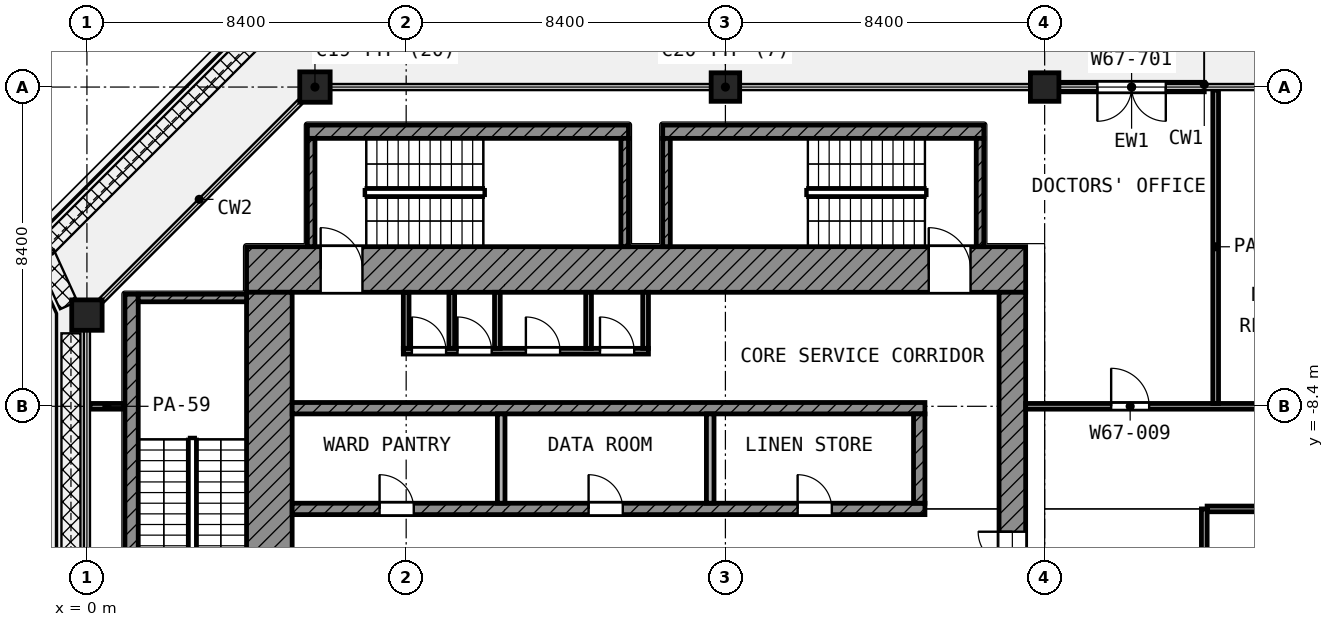
"""IFC4 building model, lengths in metres.
Left out: names, types, materials, properties, quantities, classifications, styles, units other than length and angle.
Written with IfcOpenShell. Run it as: python <this file> out.ifc"""

import sys

from ifc_helpers import new_model, si_unit, direction, frame, frame_2d, origin, origin_2d, place, context, subcontext, project, spatial, rectangle, extrude, element, fill, save


model = new_model("IFC4")
c1 = context("Model", 3, precision=1e-05, world=origin(), true_north=direction((0.0, 1.0)))
c2 = subcontext(c1, "Body", "Model", "MODEL_VIEW")
j1 = project(units=[si_unit("LENGTHUNIT", "METRE"), si_unit("PLANEANGLEUNIT", "RADIAN")], contexts=[c1])
p1 = place(None, origin())
s1 = spatial("IfcSite", under=j1, at=p1, CompositionType="ELEMENT")
p2 = place(p1, origin())
s2 = spatial("IfcBuilding", under=s1, at=p2, CompositionType="ELEMENT")
p3 = place(p2, frame((0.0, 0.0, 311.2)))
s3 = spatial("IfcBuildingStorey", under=s2, at=p3, CompositionType="ELEMENT", Elevation=311.2)
p4 = place(p3, frame((6.0, 0.0, 0.0), z_axis=(0.0, 0.0, 1.0), x_axis=(1.0, 0.0, 0.0)))
e1 = element("IfcColumn", 1, at=p4, inside=s3, PredefinedType="COLUMN", context=c2, shape_type="SweptSolid", body=[
    extrude(rectangle(XDim=0.8, YDim=0.8, at=origin_2d()), origin(), (0.0, 0.0, 1.0), 4.2),
])
for number, where, z_axis, x_axis in (
    (2, (16.8, 0.0, 0.0), (0.0, 0.0, 1.0), (1.0, 0.0, 0.0)),
    (3, (25.2, 0.0, 0.0), (0.0, 0.0, 1.0), (1.0, 0.0, 0.0)),
):
    element("IfcColumn", number, at=place(p3, frame(where, z_axis=z_axis, x_axis=x_axis)), inside=s3, PredefinedType="COLUMN", context=c2, shape_type="SweptSolid", body=[
        extrude(rectangle(XDim=0.75, YDim=0.75, at=origin_2d()), origin(), (0.0, 0.0, 1.0), 4.2),
    ])
p5 = place(p3, frame((0.0, -6.0, 0.0), z_axis=(0.0, 0.0, 1.0), x_axis=(1.0, 0.0, 0.0)))
e4 = element("IfcColumn", 4, at=p5, inside=s3, PredefinedType="COLUMN", context=c2, shape_type="SweptSolid", body=[
    extrude(rectangle(XDim=0.8, YDim=0.8, at=origin_2d()), origin(), (0.0, 0.0, 1.0), 4.2),
])
p6 = place(p3, frame((29.4, 0.0, 0.0), z_axis=(0.0, 0.0, 1.0), x_axis=(-1.0, 0.0, 0.0)))
e5 = element("IfcWall", 5, at=p6, inside=s3, PredefinedType="SOLIDWALL", context=c2, shape_type="SweptSolid", body=[
    extrude(rectangle(XDim=3.825, YDim=0.25, at=frame_2d((1.913, 0.0))), origin(), (0.0, 0.0, 1.0), 3.48),
])
p7 = place(p6, frame((1.012, 0.0, 0.0)))
e6 = element("IfcOpeningElement", 6, at=p7, cuts=e5, PredefinedType="OPENING", context=c2, shape_type="SweptSolid", body=[
    extrude(rectangle(XDim=1.8, YDim=2.1, at=frame_2d((0.9, 1.05))), frame((0.0, 0.135, 0.0), z_axis=(0.0, -1.0, 0.0), x_axis=(1.0, 0.0, 0.0)), (0.0, 0.0, 1.0), 0.27),
])
p8 = place(p3, frame((4.2, -4.8, 0.0), z_axis=(0.0, 0.0, 1.0), x_axis=(1.0, 0.0, 0.0)))
e7 = element("IfcWall", 7, at=p8, inside=s3, PredefinedType="SHEAR", context=c2, shape_type="SweptSolid", body=[
    extrude(rectangle(XDim=20.5, YDim=1.2, at=frame_2d((10.25, 0.0))), origin(), (0.0, 0.0, 1.0), 3.6),
])
p9 = place(p8, frame((1.95, 0.0, 0.0)))
e8 = element("IfcOpeningElement", 8, at=p9, cuts=e7, PredefinedType="OPENING", context=c2, shape_type="SweptSolid", body=[
    extrude(rectangle(XDim=1.1, YDim=2.1, at=frame_2d((0.55, 1.05))), frame((0.0, 0.61, 0.0), z_axis=(0.0, -1.0, 0.0), x_axis=(1.0, 0.0, 0.0)), (0.0, 0.0, 1.0), 1.22),
])
p10 = place(p8, frame((17.95, 0.0, 0.0)))
e9 = element("IfcOpeningElement", 9, at=p10, cuts=e7, PredefinedType="OPENING", context=c2, shape_type="SweptSolid", body=[
    extrude(rectangle(XDim=1.1, YDim=2.1, at=frame_2d((0.55, 1.05))), frame((0.0, 0.61, 0.0), z_axis=(0.0, -1.0, 0.0), x_axis=(1.0, 0.0, 0.0)), (0.0, 0.0, 1.0), 1.22),
])
p11 = place(p3, frame((4.8, -24.7, 0.0), z_axis=(0.0, 0.0, 1.0), x_axis=(0.0, 1.0, 0.0)))
e10 = element("IfcWall", 10, at=p11, inside=s3, PredefinedType="SHEAR", context=c2, shape_type="SweptSolid", body=[
    extrude(rectangle(XDim=19.3, YDim=1.2, at=frame_2d((9.65, 0.0))), origin(), (0.0, 0.0, 1.0), 3.6),
])
p12 = place(p11, frame((11.15, 0.0, 0.0)))
e11 = element("IfcOpeningElement", 11, at=p12, cuts=e10, PredefinedType="OPENING", context=c2, shape_type="SweptSolid", body=[
    extrude(rectangle(XDim=1.1, YDim=2.1, at=frame_2d((0.55, 1.05))), frame((0.0, 0.61, 0.0), z_axis=(0.0, -1.0, 0.0), x_axis=(1.0, 0.0, 0.0)), (0.0, 0.0, 1.0), 1.22),
])
p13 = place(p11, frame((1.85, 0.0, 0.0)))
e12 = element("IfcOpeningElement", 12, at=p13, cuts=e10, PredefinedType="OPENING", context=c2, shape_type="SweptSolid", body=[
    extrude(rectangle(XDim=1.1, YDim=2.1, at=frame_2d((0.55, 1.05))), frame((0.0, 0.61, 0.0), z_axis=(0.0, -1.0, 0.0), x_axis=(1.0, 0.0, 0.0)), (0.0, 0.0, 1.0), 1.22),
])
p14 = place(p3, frame((24.35, -24.0, 0.0), z_axis=(0.0, 0.0, 1.0), x_axis=(0.0, 1.0, 0.0)))
e13 = element("IfcWall", 13, at=p14, inside=s3, PredefinedType="SHEAR", context=c2, shape_type="SweptSolid", body=[
    extrude(rectangle(XDim=18.6, YDim=0.7, at=frame_2d((9.3, 0.0))), origin(), (0.0, 0.0, 1.0), 3.6),
])
p15 = place(p14, frame((10.5, 0.0, 0.0)))
e14 = element("IfcOpeningElement", 14, at=p15, cuts=e13, PredefinedType="OPENING", context=c2, shape_type="SweptSolid", body=[
    extrude(rectangle(XDim=1.8, YDim=2.1, at=frame_2d((0.9, 1.05))), frame((0.0, 0.36, 0.0), z_axis=(0.0, -1.0, 0.0), x_axis=(1.0, 0.0, 0.0)), (0.0, 0.0, 1.0), 0.72),
])
p16 = place(p3, frame((5.4, -8.45, 0.0), z_axis=(0.0, 0.0, 1.0), x_axis=(1.0, 0.0, 0.0)))
e15 = element("IfcWall", 15, at=p16, inside=s3, PredefinedType="SHEAR", context=c2, shape_type="SweptSolid", body=[
    extrude(rectangle(XDim=16.65, YDim=0.3, at=frame_2d((8.325, 0.0))), origin(), (0.0, 0.0, 1.0), 3.6),
])
p17 = place(p3, frame((5.4, -11.1, 0.0), z_axis=(0.0, 0.0, 1.0), x_axis=(1.0, 0.0, 0.0)))
e16 = element("IfcWall", 16, at=p17, inside=s3, PredefinedType="SHEAR", context=c2, shape_type="SweptSolid", body=[
    extrude(rectangle(XDim=16.65, YDim=0.3, at=frame_2d((8.325, 0.0))), origin(), (0.0, 0.0, 1.0), 3.6),
])
p18 = place(p17, frame((2.3, 0.0, 0.0)))
e17 = element("IfcOpeningElement", 17, at=p18, cuts=e16, PredefinedType="OPENING", context=c2, shape_type="SweptSolid", body=[
    extrude(rectangle(XDim=0.9, YDim=2.1, at=frame_2d((0.45, 1.05))), frame((0.0, 0.16, 0.0), z_axis=(0.0, -1.0, 0.0), x_axis=(1.0, 0.0, 0.0)), (0.0, 0.0, 1.0), 0.32),
])
p19 = place(p17, frame((7.8, 0.0, 0.0)))
e18 = element("IfcOpeningElement", 18, at=p19, cuts=e16, PredefinedType="OPENING", context=c2, shape_type="SweptSolid", body=[
    extrude(rectangle(XDim=0.9, YDim=2.1, at=frame_2d((0.45, 1.05))), frame((0.0, 0.16, 0.0), z_axis=(0.0, -1.0, 0.0), x_axis=(1.0, 0.0, 0.0)), (0.0, 0.0, 1.0), 0.32),
])
p20 = place(p17, frame((13.3, 0.0, 0.0)))
e19 = element("IfcOpeningElement", 19, at=p20, cuts=e16, PredefinedType="OPENING", context=c2, shape_type="SweptSolid", body=[
    extrude(rectangle(XDim=0.9, YDim=2.1, at=frame_2d((0.45, 1.05))), frame((0.0, 0.16, 0.0), z_axis=(0.0, -1.0, 0.0), x_axis=(1.0, 0.0, 0.0)), (0.0, 0.0, 1.0), 0.32),
])
p21 = place(p3, frame((21.9, -10.95, 0.0), z_axis=(0.0, 0.0, 1.0), x_axis=(0.0, 1.0, 0.0)))
e20 = element("IfcWall", 20, at=p21, inside=s3, PredefinedType="SHEAR", context=c2, shape_type="SweptSolid", body=[
    extrude(rectangle(XDim=2.35, YDim=0.3, at=frame_2d((1.175, 0.0))), origin(), (0.0, 0.0, 1.0), 3.6),
])
for number, where, z_axis, x_axis in (
    (21, (10.9, -10.95, 0.0), (0.0, 0.0, 1.0), (0.0, 1.0, 0.0)),
    (22, (16.4, -10.95, 0.0), (0.0, 0.0, 1.0), (0.0, 1.0, 0.0)),
):
    element("IfcWall", number, at=place(p3, frame(where, z_axis=z_axis, x_axis=x_axis)), inside=s3, PredefinedType="PARTITIONING", context=c2, shape_type="SweptSolid", body=[
        extrude(rectangle(XDim=2.35, YDim=0.2, at=frame_2d((1.175, 0.0))), origin(), (0.0, 0.0, 1.0), 3.6),
    ])
p22 = place(p3, frame((8.325, -6.95, 0.0), z_axis=(0.0, 0.0, 1.0), x_axis=(1.0, 0.0, 0.0)))
e23 = element("IfcWall", 23, at=p22, inside=s3, PredefinedType="PARTITIONING", context=c2, shape_type="SweptSolid", body=[
    extrude(rectangle(XDim=6.45, YDim=0.15, at=frame_2d((3.225, 0.0))), origin(), (0.0, 0.0, 1.0), 3.6),
])
p23 = place(p22, frame((0.225, 0.0, 0.0)))
e24 = element("IfcOpeningElement", 24, at=p23, cuts=e23, PredefinedType="OPENING", context=c2, shape_type="SweptSolid", body=[
    extrude(rectangle(XDim=0.9, YDim=2.1, at=frame_2d((0.45, 1.05))), frame((0.0, 0.085, 0.0), z_axis=(0.0, -1.0, 0.0), x_axis=(1.0, 0.0, 0.0)), (0.0, 0.0, 1.0), 0.17),
])
p24 = place(p22, frame((1.425, 0.0, 0.0)))
e25 = element("IfcOpeningElement", 25, at=p24, cuts=e23, PredefinedType="OPENING", context=c2, shape_type="SweptSolid", body=[
    extrude(rectangle(XDim=0.9, YDim=2.1, at=frame_2d((0.45, 1.05))), frame((0.0, 0.085, 0.0), z_axis=(0.0, -1.0, 0.0), x_axis=(1.0, 0.0, 0.0)), (0.0, 0.0, 1.0), 0.17),
])
p25 = place(p22, frame((3.225, 0.0, 0.0)))
e26 = element("IfcOpeningElement", 26, at=p25, cuts=e23, PredefinedType="OPENING", context=c2, shape_type="SweptSolid", body=[
    extrude(rectangle(XDim=0.9, YDim=2.1, at=frame_2d((0.45, 1.05))), frame((0.0, 0.085, 0.0), z_axis=(0.0, -1.0, 0.0), x_axis=(1.0, 0.0, 0.0)), (0.0, 0.0, 1.0), 0.17),
])
p26 = place(p22, frame((5.175, 0.0, 0.0)))
e27 = element("IfcOpeningElement", 27, at=p26, cuts=e23, PredefinedType="OPENING", context=c2, shape_type="SweptSolid", body=[
    extrude(rectangle(XDim=0.9, YDim=2.1, at=frame_2d((0.45, 1.05))), frame((0.0, 0.085, 0.0), z_axis=(0.0, -1.0, 0.0), x_axis=(1.0, 0.0, 0.0)), (0.0, 0.0, 1.0), 0.17),
])
for number, where, z_axis, x_axis in (
    (28, (8.4, -6.875, 0.0), (0.0, 0.0, 1.0), (0.0, 1.0, 0.0)),
    (29, (9.6, -6.875, 0.0), (0.0, 0.0, 1.0), (0.0, 1.0, 0.0)),
    (30, (10.8, -6.875, 0.0), (0.0, 0.0, 1.0), (0.0, 1.0, 0.0)),
    (31, (13.2, -6.875, 0.0), (0.0, 0.0, 1.0), (0.0, 1.0, 0.0)),
    (32, (14.7, -6.875, 0.0), (0.0, 0.0, 1.0), (0.0, 1.0, 0.0)),
):
    element("IfcWall", number, at=place(p3, frame(where, z_axis=z_axis, x_axis=x_axis)), inside=s3, PredefinedType="PARTITIONING", context=c2, shape_type="SweptSolid", body=[
        extrude(rectangle(XDim=1.475, YDim=0.15, at=frame_2d((0.738, 0.0))), origin(), (0.0, 0.0, 1.0), 3.6),
    ])
p27 = place(p3, frame((1.175, -13.9, 0.0), z_axis=(0.0, 0.0, 1.0), x_axis=(0.0, 1.0, 0.0)))
e33 = element("IfcWall", 33, at=p27, inside=s3, PredefinedType="SHEAR", context=c2, shape_type="SweptSolid", body=[
    extrude(rectangle(XDim=8.45, YDim=0.35, at=frame_2d((4.225, 0.0))), origin(), (0.0, 0.0, 1.0), 3.6),
])
p28 = place(p3, frame((1.35, -5.55, 0.0), z_axis=(0.0, 0.0, 1.0), x_axis=(1.0, 0.0, 0.0)))
e34 = element("IfcWall", 34, at=p28, inside=s3, PredefinedType="SHEAR", context=c2, shape_type="SweptSolid", body=[
    extrude(rectangle(XDim=2.85, YDim=0.2, at=frame_2d((1.425, 0.0))), origin(), (0.0, 0.0, 1.0), 3.6),
])
p29 = place(p3, frame((5.8, -1.175, 0.0), z_axis=(0.0, 0.0, 1.0), x_axis=(1.0, 0.0, 0.0)))
e35 = element("IfcWall", 35, at=p29, inside=s3, PredefinedType="SHEAR", context=c2, shape_type="SweptSolid", body=[
    extrude(rectangle(XDim=8.45, YDim=0.35, at=frame_2d((4.225, 0.0))), origin(), (0.0, 0.0, 1.0), 3.6),
])
for number, where, z_axis, x_axis in (
    (36, (5.9, -4.2, 0.0), (0.0, 0.0, 1.0), (0.0, 1.0, 0.0)),
    (37, (14.15, -4.2, 0.0), (0.0, 0.0, 1.0), (0.0, 1.0, 0.0)),
):
    element("IfcWall", number, at=place(p3, frame(where, z_axis=z_axis, x_axis=x_axis)), inside=s3, PredefinedType="SHEAR", context=c2, shape_type="SweptSolid", body=[
        extrude(rectangle(XDim=2.85, YDim=0.2, at=frame_2d((1.425, 0.0))), origin(), (0.0, 0.0, 1.0), 3.6),
    ])
p30 = place(p3, frame((15.15, -1.175, 0.0), z_axis=(0.0, 0.0, 1.0), x_axis=(1.0, 0.0, 0.0)))
e38 = element("IfcWall", 38, at=p30, inside=s3, PredefinedType="SHEAR", context=c2, shape_type="SweptSolid", body=[
    extrude(rectangle(XDim=8.45, YDim=0.35, at=frame_2d((4.225, 0.0))), origin(), (0.0, 0.0, 1.0), 3.6),
])
for number, where, z_axis, x_axis in (
    (39, (15.25, -4.2, 0.0), (0.0, 0.0, 1.0), (0.0, 1.0, 0.0)),
    (40, (23.5, -4.2, 0.0), (0.0, 0.0, 1.0), (0.0, 1.0, 0.0)),
):
    element("IfcWall", number, at=place(p3, frame(where, z_axis=z_axis, x_axis=x_axis)), inside=s3, PredefinedType="SHEAR", context=c2, shape_type="SweptSolid", body=[
        extrude(rectangle(XDim=2.85, YDim=0.2, at=frame_2d((1.425, 0.0))), origin(), (0.0, 0.0, 1.0), 3.6),
    ])
p31 = place(p3, frame((29.475, -11.1, 0.0), z_axis=(0.0, 0.0, 1.0), x_axis=(1.0, 0.0, 0.0)))
e41 = element("IfcWall", 41, at=p31, inside=s3, PredefinedType="PARTITIONING", context=c2, shape_type="SweptSolid", body=[
    extrude(rectangle(XDim=29.245, YDim=0.15, at=frame_2d((14.623, 0.0))), origin(), (0.0, 0.0, 1.0), 3.6),
])
p32 = place(p31, frame((3.525, 0.0, 0.0)))
e42 = element("IfcOpeningElement", 42, at=p32, cuts=e41, PredefinedType="OPENING", context=c2, shape_type="SweptSolid", body=[
    extrude(rectangle(XDim=1.2, YDim=2.1, at=frame_2d((0.6, 1.05))), frame((0.0, 0.085, 0.0), z_axis=(0.0, -1.0, 0.0), x_axis=(1.0, 0.0, 0.0)), (0.0, 0.0, 1.0), 0.17),
])
p33 = place(p31, frame((15.285, 0.0, 0.0)))
e43 = element("IfcOpeningElement", 43, at=p33, cuts=e41, PredefinedType="OPENING", context=c2, shape_type="SweptSolid", body=[
    extrude(rectangle(XDim=1.2, YDim=2.1, at=frame_2d((0.6, 1.05))), frame((0.0, 0.085, 0.0), z_axis=(0.0, -1.0, 0.0), x_axis=(1.0, 0.0, 0.0)), (0.0, 0.0, 1.0), 0.17),
])
p34 = place(p31, frame((13.745, 0.0, 0.0)))
e44 = element("IfcOpeningElement", 44, at=p34, cuts=e41, PredefinedType="OPENING", context=c2, shape_type="SweptSolid", body=[
    extrude(rectangle(XDim=1.2, YDim=2.1, at=frame_2d((0.6, 1.05))), frame((0.0, 0.085, 0.0), z_axis=(0.0, -1.0, 0.0), x_axis=(1.0, 0.0, 0.0)), (0.0, 0.0, 1.0), 0.17),
])
p35 = place(p31, frame((18.325, 0.0, 0.0)))
e45 = element("IfcOpeningElement", 45, at=p35, cuts=e41, PredefinedType="OPENING", context=c2, shape_type="SweptSolid", body=[
    extrude(rectangle(XDim=1.0, YDim=2.1, at=frame_2d((0.5, 1.05))), frame((0.0, 0.085, 0.0), z_axis=(0.0, -1.0, 0.0), x_axis=(1.0, 0.0, 0.0)), (0.0, 0.0, 1.0), 0.17),
])
p36 = place(p31, frame((24.375, 0.0, 0.0)))
e46 = element("IfcOpeningElement", 46, at=p36, cuts=e41, PredefinedType="OPENING", context=c2, shape_type="SweptSolid", body=[
    extrude(rectangle(XDim=1.5, YDim=2.1, at=frame_2d((0.75, 1.05))), frame((0.0, 0.085, 0.0), z_axis=(0.0, -1.0, 0.0), x_axis=(1.0, 0.0, 0.0)), (0.0, 0.0, 1.0), 0.17),
])
p37 = place(p3, frame((0.08, -8.4, 0.0), z_axis=(0.0, 0.0, 1.0), x_axis=(1.0, 0.0, 0.0)))
e47 = element("IfcWall", 47, at=p37, inside=s3, PredefinedType="PARTITIONING", context=c2, shape_type="SweptSolid", body=[
    extrude(rectangle(XDim=0.89, YDim=0.15, at=frame_2d((0.445, 0.0))), origin(), (0.0, 0.0, 1.0), 2.7),
])
p38 = place(p3, frame((24.7, -8.4, 0.0), z_axis=(0.0, 0.0, 1.0), x_axis=(1.0, 0.0, 0.0)))
e48 = element("IfcWall", 48, at=p38, inside=s3, PredefinedType="PARTITIONING", context=c2, shape_type="SweptSolid", body=[
    extrude(rectangle(XDim=15.582, YDim=0.15, at=frame_2d((7.791, 0.0))), origin(), (0.0, 0.0, 1.0), 3.6),
])
p39 = place(p38, frame((2.25, 0.0, 0.0)))
e49 = element("IfcOpeningElement", 49, at=p39, cuts=e48, PredefinedType="OPENING", context=c2, shape_type="SweptSolid", body=[
    extrude(rectangle(XDim=1.0, YDim=2.1, at=frame_2d((0.5, 1.05))), frame((0.0, 0.085, 0.0), z_axis=(0.0, -1.0, 0.0), x_axis=(1.0, 0.0, 0.0)), (0.0, 0.0, 1.0), 0.17),
])
p40 = place(p38, frame((6.55, 0.0, 0.0)))
e50 = element("IfcOpeningElement", 50, at=p40, cuts=e48, PredefinedType="OPENING", context=c2, shape_type="SweptSolid", body=[
    extrude(rectangle(XDim=1.2, YDim=2.1, at=frame_2d((0.6, 1.05))), frame((0.0, 0.085, 0.0), z_axis=(0.0, -1.0, 0.0), x_axis=(1.0, 0.0, 0.0)), (0.0, 0.0, 1.0), 0.17),
])
p41 = place(p38, frame((9.7, 0.0, 0.0)))
e51 = element("IfcOpeningElement", 51, at=p41, cuts=e48, PredefinedType="OPENING", context=c2, shape_type="SweptSolid", body=[
    extrude(rectangle(XDim=0.9, YDim=2.1, at=frame_2d((0.45, 1.05))), frame((0.0, 0.085, 0.0), z_axis=(0.0, -1.0, 0.0), x_axis=(1.0, 0.0, 0.0)), (0.0, 0.0, 1.0), 0.17),
])
p42 = place(p38, frame((11.55, 0.0, 0.0)))
e52 = element("IfcOpeningElement", 52, at=p42, cuts=e48, PredefinedType="OPENING", context=c2, shape_type="SweptSolid", body=[
    extrude(rectangle(XDim=1.0, YDim=2.1, at=frame_2d((0.5, 1.05))), frame((0.0, 0.085, 0.0), z_axis=(0.0, -1.0, 0.0), x_axis=(1.0, 0.0, 0.0)), (0.0, 0.0, 1.0), 0.17),
])
p43 = place(p3, frame((29.4, -31.198, 0.0), z_axis=(0.0, 0.0, 1.0), x_axis=(0.0, 1.0, 0.0)))
e53 = element("IfcWall", 53, at=p43, inside=s3, PredefinedType="PARTITIONING", context=c2, shape_type="SweptSolid", body=[
    extrude(rectangle(XDim=20.098, YDim=0.15, at=frame_2d((10.049, 0.0))), origin(), (0.0, 0.0, 1.0), 3.6),
])
p44 = place(p3, frame((29.7, -8.325, 0.0), z_axis=(0.0, 0.0, 1.0), x_axis=(0.0, 1.0, 0.0)))
e54 = element("IfcWall", 54, at=p44, inside=s3, PredefinedType="PARTITIONING", context=c2, shape_type="SweptSolid", body=[
    extrude(rectangle(XDim=8.245, YDim=0.15, at=frame_2d((4.123, 0.0))), origin(), (0.0, 0.0, 1.0), 3.6),
])
p45 = place(p7, origin())
e55 = element("IfcDoor", 55, at=p45, inside=s3, OperationType="DOUBLE_DOOR_SINGLE_SWING", PredefinedType="DOOR", context=c2, shape_type="SweptSolid", body=[
    extrude(rectangle(XDim=1.8, YDim=2.1, at=frame_2d((0.9, 1.05))), frame((0.0, 0.025, 0.0), z_axis=(0.0, -1.0, 0.0), x_axis=(1.0, 0.0, 0.0)), (0.0, 0.0, 1.0), 0.05),
])
fill(e6, e55)
p46 = place(p9, origin())
e56 = element("IfcDoor", 56, at=p46, inside=s3, OperationType="SINGLE_SWING_LEFT", PredefinedType="DOOR", context=c2, shape_type="SweptSolid", body=[
    extrude(rectangle(XDim=1.1, YDim=2.1, at=frame_2d((0.55, 1.05))), frame((0.0, 0.025, 0.0), z_axis=(0.0, -1.0, 0.0), x_axis=(1.0, 0.0, 0.0)), (0.0, 0.0, 1.0), 0.05),
])
fill(e8, e56)
p47 = place(p10, origin())
e57 = element("IfcDoor", 57, at=p47, inside=s3, OperationType="SINGLE_SWING_LEFT", PredefinedType="DOOR", context=c2, shape_type="SweptSolid", body=[
    extrude(rectangle(XDim=1.1, YDim=2.1, at=frame_2d((0.55, 1.05))), frame((0.0, 0.025, 0.0), z_axis=(0.0, -1.0, 0.0), x_axis=(1.0, 0.0, 0.0)), (0.0, 0.0, 1.0), 0.05),
])
fill(e9, e57)
p48 = place(p15, origin())
e58 = element("IfcDoor", 58, at=p48, inside=s3, OperationType="DOUBLE_DOOR_SINGLE_SWING", PredefinedType="DOOR", context=c2, shape_type="SweptSolid", body=[
    extrude(rectangle(XDim=1.8, YDim=2.1, at=frame_2d((0.9, 1.05))), frame((0.0, 0.025, 0.0), z_axis=(0.0, -1.0, 0.0), x_axis=(1.0, 0.0, 0.0)), (0.0, 0.0, 1.0), 0.05),
])
fill(e14, e58)
p49 = place(p23, origin())
e59 = element("IfcDoor", 59, at=p49, inside=s3, OperationType="SINGLE_SWING_LEFT", PredefinedType="DOOR", context=c2, shape_type="SweptSolid", body=[
    extrude(rectangle(XDim=0.9, YDim=2.1, at=frame_2d((0.45, 1.05))), frame((0.0, 0.025, 0.0), z_axis=(0.0, -1.0, 0.0), x_axis=(1.0, 0.0, 0.0)), (0.0, 0.0, 1.0), 0.05),
])
fill(e24, e59)
p50 = place(p24, origin())
e60 = element("IfcDoor", 60, at=p50, inside=s3, OperationType="SINGLE_SWING_LEFT", PredefinedType="DOOR", context=c2, shape_type="SweptSolid", body=[
    extrude(rectangle(XDim=0.9, YDim=2.1, at=frame_2d((0.45, 1.05))), frame((0.0, 0.025, 0.0), z_axis=(0.0, -1.0, 0.0), x_axis=(1.0, 0.0, 0.0)), (0.0, 0.0, 1.0), 0.05),
])
fill(e25, e60)
p51 = place(p25, origin())
e61 = element("IfcDoor", 61, at=p51, inside=s3, OperationType="SINGLE_SWING_LEFT", PredefinedType="DOOR", context=c2, shape_type="SweptSolid", body=[
    extrude(rectangle(XDim=0.9, YDim=2.1, at=frame_2d((0.45, 1.05))), frame((0.0, 0.025, 0.0), z_axis=(0.0, -1.0, 0.0), x_axis=(1.0, 0.0, 0.0)), (0.0, 0.0, 1.0), 0.05),
])
fill(e26, e61)
p52 = place(p26, origin())
e62 = element("IfcDoor", 62, at=p52, inside=s3, OperationType="SINGLE_SWING_LEFT", PredefinedType="DOOR", context=c2, shape_type="SweptSolid", body=[
    extrude(rectangle(XDim=0.9, YDim=2.1, at=frame_2d((0.45, 1.05))), frame((0.0, 0.025, 0.0), z_axis=(0.0, -1.0, 0.0), x_axis=(1.0, 0.0, 0.0)), (0.0, 0.0, 1.0), 0.05),
])
fill(e27, e62)
p53 = place(p18, origin())
e63 = element("IfcDoor", 63, at=p53, inside=s3, OperationType="SINGLE_SWING_LEFT", PredefinedType="DOOR", context=c2, shape_type="SweptSolid", body=[
    extrude(rectangle(XDim=0.9, YDim=2.1, at=frame_2d((0.45, 1.05))), frame((0.0, 0.025, 0.0), z_axis=(0.0, -1.0, 0.0), x_axis=(1.0, 0.0, 0.0)), (0.0, 0.0, 1.0), 0.05),
])
fill(e17, e63)
p54 = place(p19, origin())
e64 = element("IfcDoor", 64, at=p54, inside=s3, OperationType="SINGLE_SWING_LEFT", PredefinedType="DOOR", context=c2, shape_type="SweptSolid", body=[
    extrude(rectangle(XDim=0.9, YDim=2.1, at=frame_2d((0.45, 1.05))), frame((0.0, 0.025, 0.0), z_axis=(0.0, -1.0, 0.0), x_axis=(1.0, 0.0, 0.0)), (0.0, 0.0, 1.0), 0.05),
])
fill(e18, e64)
p55 = place(p20, origin())
e65 = element("IfcDoor", 65, at=p55, inside=s3, OperationType="SINGLE_SWING_LEFT", PredefinedType="DOOR", context=c2, shape_type="SweptSolid", body=[
    extrude(rectangle(XDim=0.9, YDim=2.1, at=frame_2d((0.45, 1.05))), frame((0.0, 0.025, 0.0), z_axis=(0.0, -1.0, 0.0), x_axis=(1.0, 0.0, 0.0)), (0.0, 0.0, 1.0), 0.05),
])
fill(e19, e65)
p56 = place(p39, origin())
e66 = element("IfcDoor", 66, at=p56, inside=s3, OperationType="SINGLE_SWING_LEFT", PredefinedType="DOOR", context=c2, shape_type="SweptSolid", body=[
    extrude(rectangle(XDim=1.0, YDim=2.1, at=frame_2d((0.5, 1.05))), frame((0.0, 0.025, 0.0), z_axis=(0.0, -1.0, 0.0), x_axis=(1.0, 0.0, 0.0)), (0.0, 0.0, 1.0), 0.05),
])
fill(e49, e66)
save(model, sys.argv[1])
